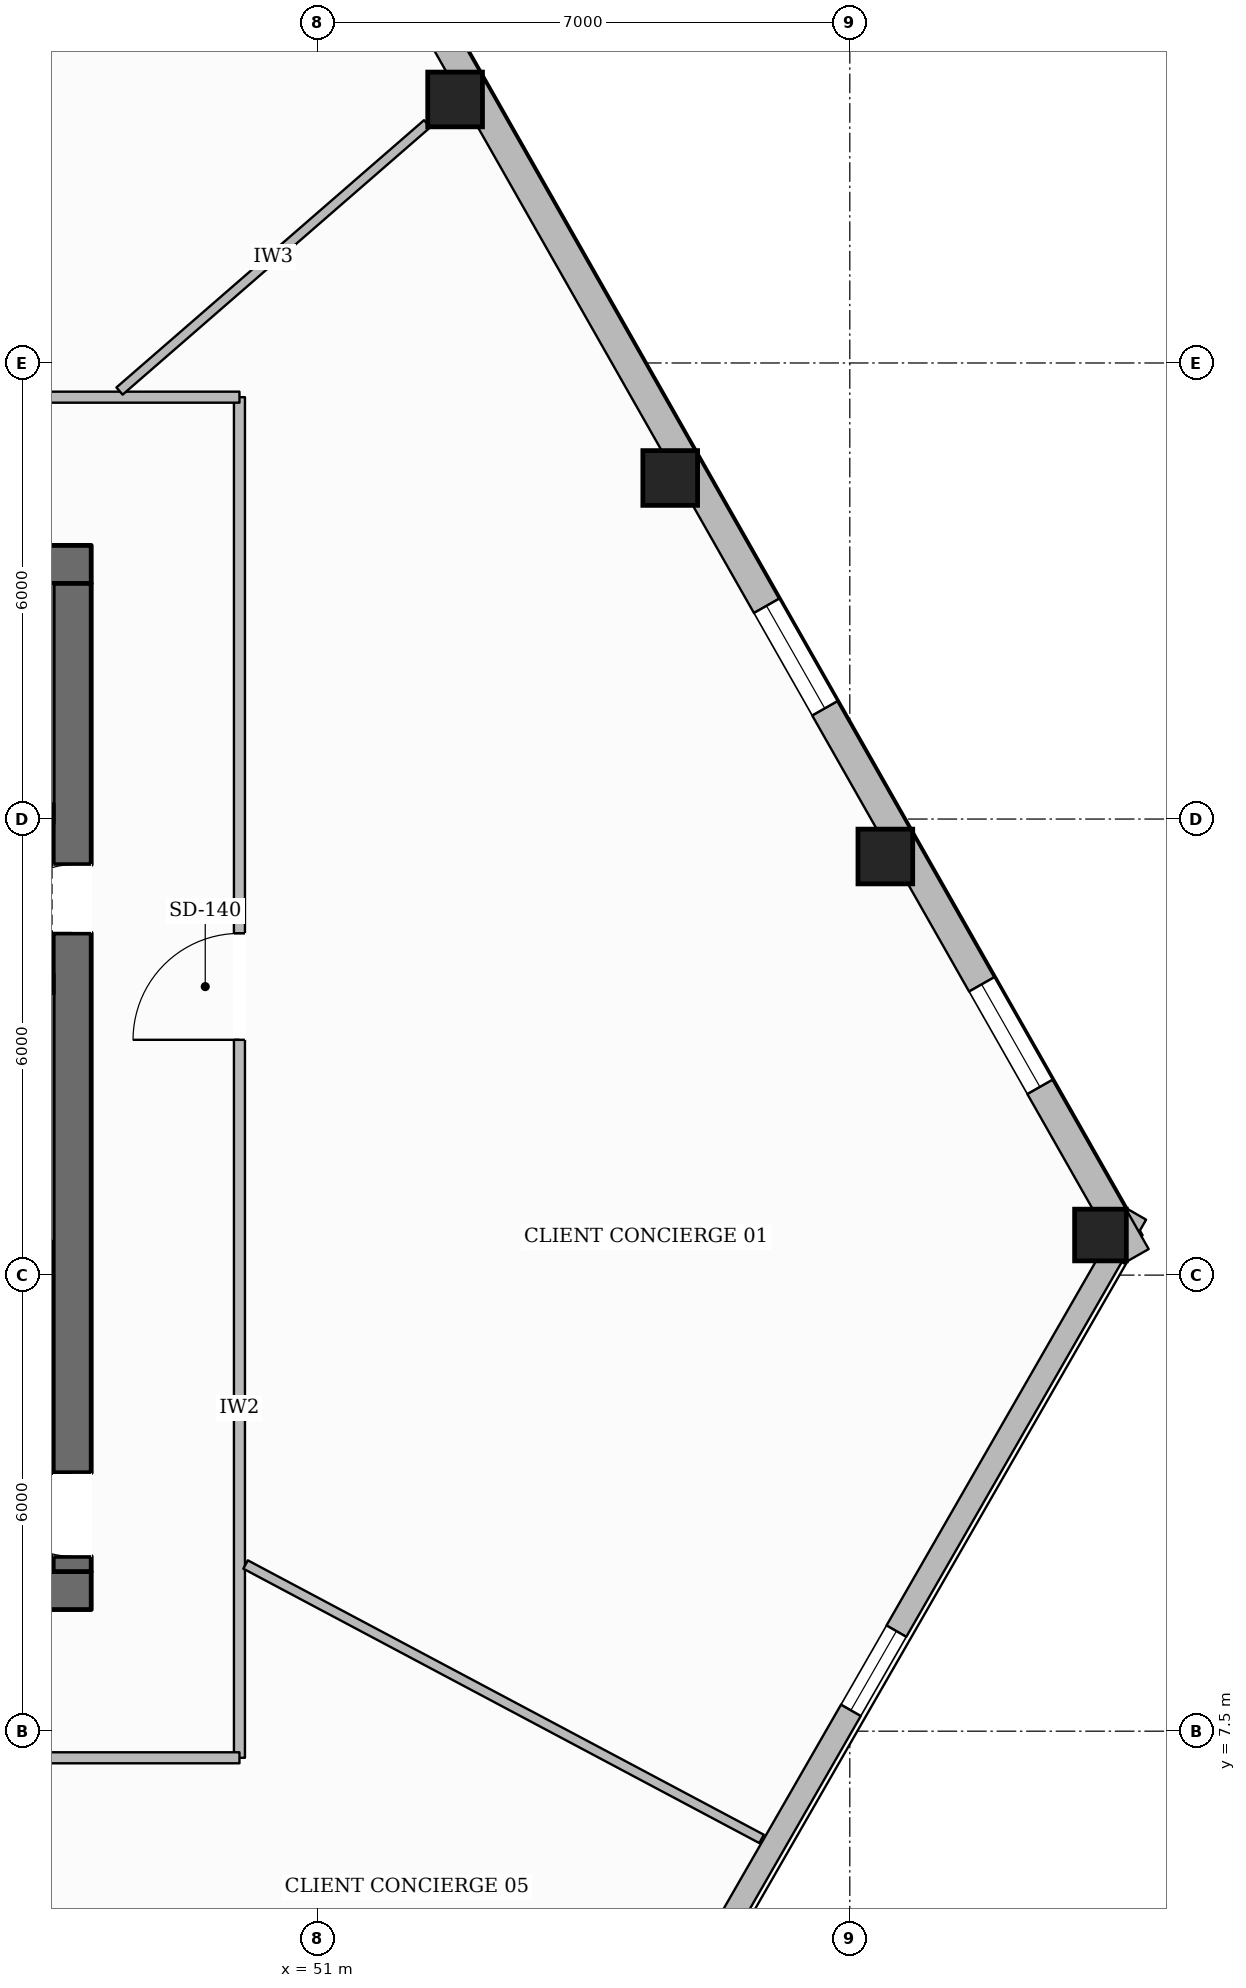
"""IFC4 building model, lengths in metres.
Left out: names, types, materials, properties, quantities, classifications, styles, units other than length and angle.
Written with IfcOpenShell. Run it as: python <this file> out.ifc"""

import sys

from ifc_helpers import new_model, si_unit, direction, frame, frame_2d, origin, origin_2d, place, context, subcontext, project, spatial, rectangle, hollow_rectangle, extrude, element, fill, save


model = new_model("IFC4")
c1 = context("Model", 3, precision=1e-05, world=origin(), true_north=direction((0.0, 1.0)))
c2 = subcontext(c1, "Body", "Model", "MODEL_VIEW")
j1 = project(units=[si_unit("LENGTHUNIT", "METRE"), si_unit("PLANEANGLEUNIT", "RADIAN")], contexts=[c1])
p1 = place(None, origin())
s1 = spatial("IfcSite", under=j1, at=p1, CompositionType="ELEMENT")
p2 = place(p1, origin())
s2 = spatial("IfcBuilding", under=s1, at=p2, CompositionType="ELEMENT")
p3 = place(p2, frame((0.0, 0.0, 85.5)))
s3 = spatial("IfcBuildingStorey", under=s2, at=p3, CompositionType="ELEMENT", Elevation=85.5)
p4 = place(p3, frame((27.98, 9.35, 0.0), z_axis=(0.0, 0.0, 1.0), x_axis=(1.0, 0.0, 0.0)))
e1 = element("IfcWall", 1, at=p4, inside=s3, PredefinedType="SOLIDWALL", context=c2, shape_type="SweptSolid", body=[
    extrude(rectangle(XDim=20.04, YDim=0.5, at=frame_2d((10.02, 0.0))), origin(), (0.0, 0.0, 1.0), 3.6),
])
p5 = place(p4, frame((10.52, 0.0, 0.0)))
e2 = element("IfcOpeningElement", 2, at=p5, cuts=e1, PredefinedType="OPENING", context=c2, shape_type="SweptSolid", body=[
    extrude(rectangle(XDim=1.4, YDim=2.2, at=frame_2d((0.7, 1.1))), frame((0.0, 0.26, 0.0), z_axis=(0.0, -1.0, 0.0), x_axis=(1.0, 0.0, 0.0)), (0.0, 0.0, 1.0), 0.52),
])
p6 = place(p3, frame((27.98, 22.85, 0.0), z_axis=(0.0, 0.0, 1.0), x_axis=(1.0, 0.0, 0.0)))
e3 = element("IfcWall", 3, at=p6, inside=s3, PredefinedType="SOLIDWALL", context=c2, shape_type="SweptSolid", body=[
    extrude(rectangle(XDim=20.04, YDim=0.5, at=frame_2d((10.02, 0.0))), origin(), (0.0, 0.0, 1.0), 3.6),
])
p7 = place(p6, frame((6.295, 0.0, 0.0)))
e4 = element("IfcOpeningElement", 4, at=p7, cuts=e3, PredefinedType="OPENING", context=c2, shape_type="SweptSolid", body=[
    extrude(rectangle(XDim=1.05, YDim=2.15, at=frame_2d((0.525, 1.075))), frame((0.0, 0.26, 0.0), z_axis=(0.0, -1.0, 0.0), x_axis=(1.0, 0.0, 0.0)), (0.0, 0.0, 1.0), 0.52),
])
p8 = place(p6, frame((12.695, 0.0, 0.0)))
e5 = element("IfcOpeningElement", 5, at=p8, cuts=e3, PredefinedType="OPENING", context=c2, shape_type="SweptSolid", body=[
    extrude(rectangle(XDim=1.05, YDim=2.15, at=frame_2d((0.525, 1.075))), frame((0.0, 0.26, 0.0), z_axis=(0.0, -1.0, 0.0), x_axis=(1.0, 0.0, 0.0)), (0.0, 0.0, 1.0), 0.52),
])
p9 = place(p3, frame((47.77, 9.6, 0.0), z_axis=(0.0, 0.0, 1.0), x_axis=(0.0, 1.0, 0.0)))
e6 = element("IfcWall", 6, at=p9, inside=s3, PredefinedType="SOLIDWALL", context=c2, shape_type="SweptSolid", body=[
    extrude(rectangle(XDim=13.0, YDim=0.5, at=frame_2d((6.5, 0.0))), origin(), (0.0, 0.0, 1.0), 3.6),
])
p10 = place(p9, frame((0.2, 0.0, 0.0)))
e7 = element("IfcOpeningElement", 7, at=p10, cuts=e6, PredefinedType="OPENING", context=c2, shape_type="SweptSolid", body=[
    extrude(rectangle(XDim=1.1, YDim=2.15, at=frame_2d((0.55, 1.075))), frame((0.0, 0.26, 0.0), z_axis=(0.0, -1.0, 0.0), x_axis=(1.0, 0.0, 0.0)), (0.0, 0.0, 1.0), 0.52),
])
p11 = place(p9, frame((8.4, 0.0, 0.0)))
e8 = element("IfcOpeningElement", 8, at=p11, cuts=e6, PredefinedType="OPENING", context=c2, shape_type="SweptSolid", body=[
    extrude(rectangle(XDim=0.9, YDim=2.1, at=frame_2d((0.45, 1.05))), frame((0.0, 0.26, 0.0), z_axis=(0.0, -1.0, 0.0), x_axis=(1.0, 0.0, 0.0)), (0.0, 0.0, 1.0), 0.52),
])
for number, where, z_axis, x_axis in (
    (9, (44.32, 17.33, 0.0), (0.0, 0.0, 1.0), (1.0, 0.0, 0.0)),
    (10, (44.32, 19.57, 0.0), (0.0, 0.0, 1.0), (1.0, 0.0, 0.0)),
):
    element("IfcWall", number, at=place(p3, frame(where, z_axis=z_axis, x_axis=x_axis)), inside=s3, PredefinedType="SHEAR", context=c2, shape_type="SweptSolid", body=[
        extrude(rectangle(XDim=3.2, YDim=0.26, at=frame_2d((1.6, 0.0))), origin(), (0.0, 0.0, 1.0), 3.6),
    ])
p12 = place(p3, frame((61.298, 14.028, 0.0), z_axis=(0.0, 0.0, 1.0), x_axis=(1.0, 0.0, 0.0)))
e11 = element("IfcColumn", 11, at=p12, inside=s3, PredefinedType="COLUMN", context=c2, shape_type="SweptSolid", body=[
    extrude(hollow_rectangle(XDim=0.68, YDim=0.68, WallThickness=0.03, at=origin_2d()), origin(), (0.0, 0.0, 1.0), 3.6),
])
for number, where, z_axis, x_axis in (
    (12, (58.468, 19.007, 0.0), (0.0, 0.0, 1.0), (1.0, 0.0, 0.0)),
    (13, (55.637, 23.987, 0.0), (0.0, 0.0, 1.0), (1.0, 0.0, 0.0)),
    (14, (52.807, 28.967, 0.0), (0.0, 0.0, 1.0), (1.0, 0.0, 0.0)),
):
    element("IfcColumn", number, at=place(p3, frame(where, z_axis=z_axis, x_axis=x_axis)), inside=s3, PredefinedType="COLUMN", context=c2, shape_type="SweptSolid", body=[
        extrude(hollow_rectangle(XDim=0.72, YDim=0.72, WallThickness=0.032, at=origin_2d()), origin(), (0.0, 0.0, 1.0), 3.6),
    ])
p13 = place(p3, frame((61.768, 14.304, 0.0), z_axis=(0.0, 0.0, 1.0), x_axis=(-0.498436047596, -0.866926471194, 0.0)))
e15 = element("IfcWall", 15, at=p13, inside=s3, PredefinedType="STANDARD", context=c2, shape_type="SweptSolid", body=[
    extrude(rectangle(XDim=13.862, YDim=0.3, at=frame_2d((6.931, 0.0))), origin(), (0.0, 0.0, 1.0), 3.059),
])
p14 = place(p13, frame((6.331, 0.0, 0.65)))
e16 = element("IfcOpeningElement", 16, at=p14, cuts=e15, PredefinedType="OPENING", context=c2, shape_type="SweptSolid", body=[
    extrude(rectangle(XDim=1.2, YDim=1.7, at=frame_2d((0.6, 0.85))), frame((0.0, 0.16, 0.0), z_axis=(0.0, -1.0, 0.0), x_axis=(1.0, 0.0, 0.0)), (0.0, 0.0, 1.0), 0.32),
])
p15 = place(p3, frame((44.314, 44.458, 0.0), z_axis=(0.0, 0.0, 1.0), x_axis=(0.494118179016, -0.869394746456, 0.0)))
e17 = element("IfcWall", 17, at=p15, inside=s3, PredefinedType="STANDARD", context=c2, shape_type="SweptSolid", body=[
    extrude(rectangle(XDim=35.322, YDim=0.38, at=frame_2d((17.661, 0.0))), origin(), (0.0, 0.0, 1.0), 3.059),
])
p16 = place(p15, frame((31.209, 0.0, 0.65)))
e18 = element("IfcOpeningElement", 18, at=p16, cuts=e17, PredefinedType="OPENING", context=c2, shape_type="SweptSolid", body=[
    extrude(rectangle(XDim=1.55, YDim=1.75, at=frame_2d((0.775, 0.875))), frame((0.0, 0.2, 0.0), z_axis=(0.0, -1.0, 0.0), x_axis=(1.0, 0.0, 0.0)), (0.0, 0.0, 1.0), 0.4),
])
p17 = place(p15, frame((25.481, 0.0, 0.65)))
e19 = element("IfcOpeningElement", 19, at=p17, cuts=e17, PredefinedType="OPENING", context=c2, shape_type="SweptSolid", body=[
    extrude(rectangle(XDim=1.55, YDim=1.75, at=frame_2d((0.775, 0.875))), frame((0.0, 0.2, 0.0), z_axis=(0.0, -1.0, 0.0), x_axis=(1.0, 0.0, 0.0)), (0.0, 0.0, 1.0), 0.4),
])
p18 = place(p15, frame((14.025, 0.0, 0.65)))
e20 = element("IfcOpeningElement", 20, at=p18, cuts=e17, PredefinedType="OPENING", context=c2, shape_type="SweptSolid", body=[
    extrude(rectangle(XDim=1.55, YDim=1.75, at=frame_2d((0.775, 0.875))), frame((0.0, 0.2, 0.0), z_axis=(0.0, -1.0, 0.0), x_axis=(1.0, 0.0, 0.0)), (0.0, 0.0, 1.0), 0.4),
])
p19 = place(p15, frame((8.298, 0.0, 0.65)))
e21 = element("IfcOpeningElement", 21, at=p19, cuts=e17, PredefinedType="OPENING", context=c2, shape_type="SweptSolid", body=[
    extrude(rectangle(XDim=1.55, YDim=1.75, at=frame_2d((0.775, 0.875))), frame((0.0, 0.2, 0.0), z_axis=(0.0, -1.0, 0.0), x_axis=(1.0, 0.0, 0.0)), (0.0, 0.0, 1.0), 0.4),
])
p20 = place(p15, frame((2.57, 0.0, 0.65)))
e22 = element("IfcOpeningElement", 22, at=p20, cuts=e17, PredefinedType="OPENING", context=c2, shape_type="SweptSolid", body=[
    extrude(rectangle(XDim=1.55, YDim=1.75, at=frame_2d((0.775, 0.875))), frame((0.0, 0.2, 0.0), z_axis=(0.0, -1.0, 0.0), x_axis=(1.0, 0.0, 0.0)), (0.0, 0.0, 1.0), 0.4),
])
p21 = place(p3, frame((49.97, 7.15, 0.0), z_axis=(0.0, 0.0, 1.0), x_axis=(0.0, 1.0, 0.0)))
e23 = element("IfcWall", 23, at=p21, inside=s3, PredefinedType="PARTITIONING", context=c2, shape_type="SweptSolid", body=[
    extrude(rectangle(XDim=17.9, YDim=0.145, at=frame_2d((8.95, 0.0))), origin(), (0.0, 0.0, 1.0), 3.288),
])
p22 = place(p21, frame((9.446, 0.0, 0.0)))
e24 = element("IfcOpeningElement", 24, at=p22, cuts=e23, PredefinedType="OPENING", context=c2, shape_type="SweptSolid", body=[
    extrude(rectangle(XDim=1.4, YDim=2.2, at=frame_2d((0.7, 1.1))), frame((0.0, 0.083, 0.0), z_axis=(0.0, -1.0, 0.0), x_axis=(1.0, 0.0, 0.0)), (0.0, 0.0, 1.0), 0.165),
])
p23 = place(p3, frame((49.97, 25.05, 0.0), z_axis=(0.0, 0.0, 1.0), x_axis=(-1.0, 0.0, 0.0)))
e25 = element("IfcWall", 25, at=p23, inside=s3, PredefinedType="PARTITIONING", context=c2, shape_type="SweptSolid", body=[
    extrude(rectangle(XDim=23.94, YDim=0.145, at=frame_2d((11.97, 0.0))), origin(), (0.0, 0.0, 1.0), 3.6),
])
p24 = place(p23, frame((14.53, 0.0, 0.0)))
e26 = element("IfcOpeningElement", 26, at=p24, cuts=e25, PredefinedType="OPENING", context=c2, shape_type="SweptSolid", body=[
    extrude(rectangle(XDim=0.88, YDim=2.1, at=frame_2d((0.44, 1.05))), frame((0.0, 0.083, 0.0), z_axis=(0.0, -1.0, 0.0), x_axis=(1.0, 0.0, 0.0)), (0.0, 0.0, 1.0), 0.165),
])
p25 = place(p23, frame((12.01, 0.0, 0.0)))
e27 = element("IfcOpeningElement", 27, at=p25, cuts=e25, PredefinedType="OPENING", context=c2, shape_type="SweptSolid", body=[
    extrude(rectangle(XDim=0.88, YDim=2.1, at=frame_2d((0.44, 1.05))), frame((0.0, 0.083, 0.0), z_axis=(0.0, -1.0, 0.0), x_axis=(1.0, 0.0, 0.0)), (0.0, 0.0, 1.0), 0.165),
])
p26 = place(p23, frame((9.55, 0.0, 0.0)))
e28 = element("IfcOpeningElement", 28, at=p26, cuts=e25, PredefinedType="OPENING", context=c2, shape_type="SweptSolid", body=[
    extrude(rectangle(XDim=0.96, YDim=2.1, at=frame_2d((0.48, 1.05))), frame((0.0, 0.083, 0.0), z_axis=(0.0, -1.0, 0.0), x_axis=(1.0, 0.0, 0.0)), (0.0, 0.0, 1.0), 0.165),
])
p27 = place(p23, frame((4.58, 0.0, 0.0)))
e29 = element("IfcOpeningElement", 29, at=p27, cuts=e25, PredefinedType="OPENING", context=c2, shape_type="SweptSolid", body=[
    extrude(rectangle(XDim=1.4, YDim=2.2, at=frame_2d((0.7, 1.1))), frame((0.0, 0.083, 0.0), z_axis=(0.0, -1.0, 0.0), x_axis=(1.0, 0.0, 0.0)), (0.0, 0.0, 1.0), 0.165),
])
p28 = place(p3, frame((26.03, 7.15, 0.0), z_axis=(0.0, 0.0, 1.0), x_axis=(1.0, 0.0, 0.0)))
e30 = element("IfcWall", 30, at=p28, inside=s3, PredefinedType="PARTITIONING", context=c2, shape_type="SweptSolid", body=[
    extrude(rectangle(XDim=23.94, YDim=0.145, at=frame_2d((11.97, 0.0))), origin(), (0.0, 0.0, 1.0), 3.6),
])
p29 = place(p28, frame((11.27, 0.0, 0.0)))
e31 = element("IfcOpeningElement", 31, at=p29, cuts=e30, PredefinedType="OPENING", context=c2, shape_type="SweptSolid", body=[
    extrude(rectangle(XDim=1.4, YDim=2.2, at=frame_2d((0.7, 1.1))), frame((0.0, 0.083, 0.0), z_axis=(0.0, -1.0, 0.0), x_axis=(1.0, 0.0, 0.0)), (0.0, 0.0, 1.0), 0.165),
])
p30 = place(p3, frame((48.392, 25.131, 0.0), z_axis=(0.0, 0.0, 1.0), x_axis=(0.754851545416, 0.655895681022, 0.0)))
e32 = element("IfcWall", 32, at=p30, inside=s3, PredefinedType="PARTITIONING", context=c2, shape_type="SweptSolid", body=[
    extrude(rectangle(XDim=5.361, YDim=0.125, at=frame_2d((2.681, 0.0))), origin(), (0.0, 0.0, 1.0), 3.141),
])
p31 = place(p3, frame((50.051, 9.693, 0.0), z_axis=(0.0, 0.0, 1.0), x_axis=(0.882944643011, -0.4694771106, 0.0)))
e33 = element("IfcWall", 33, at=p31, inside=s3, PredefinedType="PARTITIONING", context=c2, shape_type="SweptSolid", body=[
    extrude(rectangle(XDim=7.689, YDim=0.125, at=frame_2d((3.845, 0.0))), origin(), (0.0, 0.0, 1.0), 3.6),
])
p32 = place(p16, origin())
e34 = element("IfcWindow", 34, at=p32, inside=s3, PartitioningType="SINGLE_PANEL", PredefinedType="WINDOW", context=c2, shape_type="SweptSolid", body=[
    extrude(rectangle(XDim=1.55, YDim=1.75, at=frame_2d((0.775, 0.875))), frame((0.0, 0.03, 0.0), z_axis=(0.0, -1.0, 0.0), x_axis=(1.0, 0.0, 0.0)), (0.0, 0.0, 1.0), 0.06),
])
fill(e18, e34)
p33 = place(p17, origin())
e35 = element("IfcWindow", 35, at=p33, inside=s3, PartitioningType="SINGLE_PANEL", PredefinedType="WINDOW", context=c2, shape_type="SweptSolid", body=[
    extrude(rectangle(XDim=1.55, YDim=1.75, at=frame_2d((0.775, 0.875))), frame((0.0, 0.03, 0.0), z_axis=(0.0, -1.0, 0.0), x_axis=(1.0, 0.0, 0.0)), (0.0, 0.0, 1.0), 0.06),
])
fill(e19, e35)
p34 = place(p14, origin())
e36 = element("IfcWindow", 36, at=p34, inside=s3, PartitioningType="SINGLE_PANEL", PredefinedType="WINDOW", context=c2, shape_type="SweptSolid", body=[
    extrude(rectangle(XDim=1.2, YDim=1.7, at=frame_2d((0.6, 0.85))), frame((0.0, 0.03, 0.0), z_axis=(0.0, -1.0, 0.0), x_axis=(1.0, 0.0, 0.0)), (0.0, 0.0, 1.0), 0.06),
])
fill(e16, e36)
p35 = place(p10, origin())
e37 = element("IfcDoor", 37, at=p35, inside=s3, OperationType="SINGLE_SWING_RIGHT", PredefinedType="DOOR", context=c2, shape_type="SweptSolid", body=[
    extrude(rectangle(XDim=1.1, YDim=2.15, at=frame_2d((0.55, 1.075))), frame((0.0, 0.025, 0.0), z_axis=(0.0, -1.0, 0.0), x_axis=(1.0, 0.0, 0.0)), (0.0, 0.0, 1.0), 0.05),
])
fill(e7, e37)
p36 = place(p11, origin())
e38 = element("IfcDoor", 38, at=p36, inside=s3, OperationType="SINGLE_SWING_LEFT", PredefinedType="DOOR", context=c2, shape_type="SweptSolid", body=[
    extrude(rectangle(XDim=0.9, YDim=2.1, at=frame_2d((0.45, 1.05))), frame((0.0, 0.025, 0.0), z_axis=(0.0, -1.0, 0.0), x_axis=(1.0, 0.0, 0.0)), (0.0, 0.0, 1.0), 0.05),
])
fill(e8, e38)
p37 = place(p22, origin())
e39 = element("IfcDoor", 39, at=p37, inside=s3, OperationType="SINGLE_SWING_LEFT", PredefinedType="DOOR", context=c2, shape_type="SweptSolid", body=[
    extrude(rectangle(XDim=1.4, YDim=2.2, at=frame_2d((0.7, 1.1))), frame((0.0, 0.025, 0.0), z_axis=(0.0, -1.0, 0.0), x_axis=(1.0, 0.0, 0.0)), (0.0, 0.0, 1.0), 0.05),
])
fill(e24, e39)
save(model, sys.argv[1])
